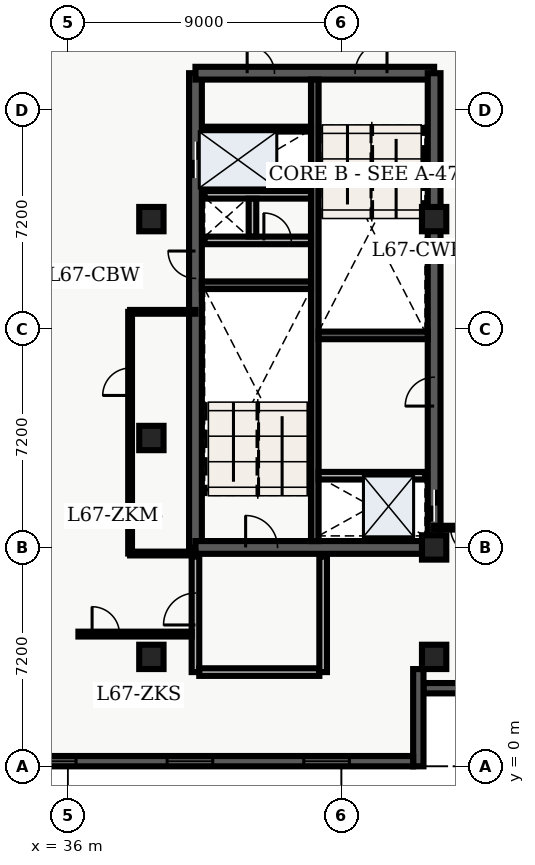
"""IFC4 building model, lengths in metres.
Left out: names, types, materials, properties, quantities, classifications, styles, units other than length and angle.
Written with IfcOpenShell. Run it as: python <this file> out.ifc"""

import sys

from ifc_helpers import new_model, entity, si_unit, converted_unit, direction, frame, origin_with_axes, origin_2d_with_axis, place, context, subcontext, project, spatial, polyline, rectangle, outline, extrude, element, fill, save


model = new_model("IFC4")
c1 = context("Model", 3, precision=1e-05, world=origin_with_axes(), true_north=direction((0.0, 1.0)))
c2 = subcontext(c1, "Body", "Model", "MODEL_VIEW")
j1 = project(units=[si_unit("LENGTHUNIT", "METRE"), converted_unit("PLANEANGLEUNIT", "DEGREE", entity("IfcPlaneAngleMeasure", 0.017), si_unit("PLANEANGLEUNIT", "RADIAN"), dimensions=[0, 0, 0, 0, 0, 0, 0])], contexts=[c1])
p1 = place(None, origin_with_axes())
s1 = spatial("IfcSite", under=j1, at=p1, CompositionType="ELEMENT")
p2 = place(p1, origin_with_axes())
s2 = spatial("IfcBuilding", under=s1, at=p2, CompositionType="ELEMENT")
p3 = place(p2, frame((0.0, 0.0, 272.4), z_axis=(0.0, 0.0, 1.0), x_axis=(1.0, 0.0, 0.0)))
s3 = spatial("IfcBuildingStorey", under=s2, at=p3, CompositionType="ELEMENT", Elevation=272.4)
p4 = place(p3, frame((40.2, 7.2, 0.0), z_axis=(0.0, 0.0, 1.0), x_axis=(0.0, 1.0, 0.0)))
e1 = element("IfcWall", 1, at=p4, inside=s3, PredefinedType="SHEAR", context=c2, shape_type="SweptSolid", body=[
    extrude(outline(polyline([(0.0, -0.21), (15.6, -0.21), (15.6, 0.21), (0.0, 0.21), (0.0, -0.21)])), origin_with_axes(), (0.0, 0.0, 1.0), 3.66),
])
p5 = place(p4, frame((12.75, 0.0, 0.0), z_axis=(0.0, 0.0, 1.0), x_axis=(1.0, 0.0, 0.0)))
e2 = element("IfcOpeningElement", 2, at=p5, cuts=e1, PredefinedType="OPENING", context=c2, shape_type="SweptSolid", body=[
    extrude(rectangle(XDim=1.2, YDim=0.44, at=origin_2d_with_axis()), origin_with_axes(), (0.0, 0.0, 1.0), 2.15),
])
p6 = place(p4, frame((9.3, 0.0, 0.0), z_axis=(0.0, 0.0, 1.0), x_axis=(1.0, 0.0, 0.0)))
e3 = element("IfcOpeningElement", 3, at=p6, cuts=e1, PredefinedType="OPENING", context=c2, shape_type="SweptSolid", body=[
    extrude(rectangle(XDim=0.9, YDim=0.44, at=origin_2d_with_axis()), origin_with_axes(), (0.0, 0.0, 1.0), 2.15),
])
p7 = place(p3, frame((40.2, 7.2, 0.0), z_axis=(0.0, 0.0, 1.0), x_axis=(1.0, 0.0, 0.0)))
e4 = element("IfcWall", 4, at=p7, inside=s3, PredefinedType="SHEAR", context=c2, shape_type="SweptSolid", body=[
    extrude(outline(polyline([(0.0, -0.21), (7.85, -0.21), (7.85, 0.21), (0.0, 0.21), (0.0, -0.21)])), origin_with_axes(), (0.0, 0.0, 1.0), 3.66),
])
p8 = place(p7, frame((2.175, 0.0, 0.0), z_axis=(0.0, 0.0, 1.0), x_axis=(1.0, 0.0, 0.0)))
e5 = element("IfcOpeningElement", 5, at=p8, cuts=e4, PredefinedType="OPENING", context=c2, shape_type="SweptSolid", body=[
    extrude(rectangle(XDim=1.05, YDim=0.44, at=origin_2d_with_axis()), origin_with_axes(), (0.0, 0.0, 1.0), 2.15),
])
p9 = place(p3, frame((40.2, 22.8, 0.0), z_axis=(0.0, 0.0, 1.0), x_axis=(1.0, 0.0, 0.0)))
e6 = element("IfcWall", 6, at=p9, inside=s3, PredefinedType="SHEAR", context=c2, shape_type="SweptSolid", body=[
    extrude(outline(polyline([(0.0, -0.21), (7.85, -0.21), (7.85, 0.21), (0.0, 0.21), (0.0, -0.21)])), origin_with_axes(), (0.0, 0.0, 1.0), 3.66),
])
p10 = place(p9, frame((5.775, 0.0, 0.0), z_axis=(0.0, 0.0, 1.0), x_axis=(1.0, 0.0, 0.0)))
e7 = element("IfcOpeningElement", 7, at=p10, cuts=e6, PredefinedType="OPENING", context=c2, shape_type="SweptSolid", body=[
    extrude(rectangle(XDim=1.05, YDim=0.44, at=origin_2d_with_axis()), origin_with_axes(), (0.0, 0.0, 1.0), 2.15),
])
p11 = place(p9, frame((2.15, 0.0, 0.0), z_axis=(0.0, 0.0, 1.0), x_axis=(1.0, 0.0, 0.0)))
e8 = element("IfcOpeningElement", 8, at=p11, cuts=e6, PredefinedType="OPENING", context=c2, shape_type="SweptSolid", body=[
    extrude(rectangle(XDim=0.9, YDim=0.44, at=origin_2d_with_axis()), origin_with_axes(), (0.0, 0.0, 1.0), 2.15),
])
p12 = place(p3, frame((48.05, 7.2, 0.0), z_axis=(0.0, 0.0, 1.0), x_axis=(0.0, 1.0, 0.0)))
e9 = element("IfcWall", 9, at=p12, inside=s3, PredefinedType="SHEAR", context=c2, shape_type="SweptSolid", body=[
    extrude(outline(polyline([(0.0, -0.21), (15.6, -0.21), (15.6, 0.21), (0.0, 0.21), (0.0, -0.21)])), origin_with_axes(), (0.0, 0.0, 1.0), 3.66),
])
p13 = place(p12, frame((1.375, 0.0, 0.0), z_axis=(0.0, 0.0, 1.0), x_axis=(1.0, 0.0, 0.0)))
e10 = element("IfcOpeningElement", 10, at=p13, cuts=e9, PredefinedType="OPENING", context=c2, shape_type="SweptSolid", body=[
    extrude(rectangle(XDim=1.05, YDim=0.44, at=origin_2d_with_axis()), origin_with_axes(), (0.0, 0.0, 1.0), 2.15),
])
p14 = place(p12, frame((5.125, 0.0, 0.0), z_axis=(0.0, 0.0, 1.0), x_axis=(1.0, 0.0, 0.0)))
e11 = element("IfcOpeningElement", 11, at=p14, cuts=e9, PredefinedType="OPENING", context=c2, shape_type="SweptSolid", body=[
    extrude(rectangle(XDim=0.95, YDim=0.44, at=origin_2d_with_axis()), origin_with_axes(), (0.0, 0.0, 1.0), 2.15),
])
p15 = place(p3, frame((44.125, 7.41, 0.0), z_axis=(0.0, 0.0, 1.0), x_axis=(0.0, 1.0, 0.0)))
e12 = element("IfcWall", 12, at=p15, inside=s3, PredefinedType="SHEAR", context=c2, shape_type="SweptSolid", body=[
    extrude(outline(polyline([(0.0, -0.125), (15.18, -0.125), (15.18, 0.125), (0.0, 0.125), (0.0, -0.125)])), origin_with_axes(), (0.0, 0.0, 1.0), 3.66),
])
for number, where, z_axis, x_axis in (
    (13, (40.41, 15.825, 0.0), (0.0, 0.0, 1.0), (1.0, 0.0, 0.0)),
    (14, (44.25, 14.175, 0.0), (0.0, 0.0, 1.0), (1.0, 0.0, 0.0)),
):
    element("IfcWall", number, at=place(p3, frame(where, z_axis=z_axis, x_axis=x_axis)), inside=s3, PredefinedType="SHEAR", context=c2, shape_type="SweptSolid", body=[
        extrude(outline(polyline([(0.0, -0.125), (3.59, -0.125), (3.59, 0.125), (0.0, 0.125), (0.0, -0.125)])), origin_with_axes(), (0.0, 0.0, 1.0), 3.66),
    ])
p16 = place(p3, frame((40.5, 17.3, 0.0), z_axis=(0.0, 0.0, 1.0), x_axis=(1.0, 0.0, 0.0)))
e15 = element("IfcWall", 15, at=p16, inside=s3, PredefinedType="SOLIDWALL", context=c2, shape_type="SweptSolid", body=[
    extrude(outline(polyline([(0.0, -0.125), (3.5, -0.125), (3.5, 0.125), (0.0, 0.125), (0.0, -0.125)])), origin_with_axes(), (0.0, 0.0, 1.0), 2.7),
])
p17 = place(p16, frame((2.4, 0.0, 0.0), z_axis=(0.0, 0.0, 1.0), x_axis=(1.0, 0.0, 0.0)))
e16 = element("IfcOpeningElement", 16, at=p17, cuts=e15, PredefinedType="OPENING", context=c2, shape_type="SweptSolid", body=[
    extrude(rectangle(XDim=0.9, YDim=0.27, at=origin_2d_with_axis()), origin_with_axes(), (0.0, 0.0, 1.0), 2.15),
])
p18 = place(p3, frame((40.5, 18.8, 0.0), z_axis=(0.0, 0.0, 1.0), x_axis=(1.0, 0.0, 0.0)))
e17 = element("IfcWall", 17, at=p18, inside=s3, PredefinedType="SOLIDWALL", context=c2, shape_type="SweptSolid", body=[
    extrude(outline(polyline([(0.0, -0.125), (3.5, -0.125), (3.5, 0.125), (0.0, 0.125), (0.0, -0.125)])), origin_with_axes(), (0.0, 0.0, 1.0), 2.7),
])
p19 = place(p3, frame((42.075, 17.43, 0.0), z_axis=(0.0, 0.0, 1.0), x_axis=(0.0, 1.0, 0.0)))
e18 = element("IfcWall", 18, at=p19, inside=s3, PredefinedType="SOLIDWALL", context=c2, shape_type="SweptSolid", body=[
    extrude(outline(polyline([(0.0, -0.125), (1.24, -0.125), (1.24, 0.125), (0.0, 0.125), (0.0, -0.125)])), origin_with_axes(), (0.0, 0.0, 1.0), 2.7),
])
p20 = place(p3, frame((40.2, 3.1, 0.0), z_axis=(0.0, 0.0, 1.0), x_axis=(0.0, 1.0, 0.0)))
e19 = element("IfcWall", 19, at=p20, inside=s3, PredefinedType="SOLIDWALL", context=c2, shape_type="SweptSolid", body=[
    extrude(outline(polyline([(0.0, -0.125), (3.8, -0.125), (3.8, 0.125), (0.0, 0.125), (0.0, -0.125)])), origin_with_axes(), (0.0, 0.0, 1.0), 2.7),
])
p21 = place(p20, frame((2.075, 0.0, 0.0), z_axis=(0.0, 0.0, 1.0), x_axis=(1.0, 0.0, 0.0)))
e20 = element("IfcOpeningElement", 20, at=p21, cuts=e19, PredefinedType="OPENING", context=c2, shape_type="SweptSolid", body=[
    extrude(rectangle(XDim=1.05, YDim=0.27, at=origin_2d_with_axis()), origin_with_axes(), (0.0, 0.0, 1.0), 2.15),
])
p22 = place(p3, frame((40.325, 3.1, 0.0), z_axis=(0.0, 0.0, 1.0), x_axis=(1.0, 0.0, 0.0)))
e21 = element("IfcWall", 21, at=p22, inside=s3, PredefinedType="SOLIDWALL", context=c2, shape_type="SweptSolid", body=[
    extrude(outline(polyline([(0.0, -0.125), (3.95, -0.125), (3.95, 0.125), (0.0, 0.125), (0.0, -0.125)])), origin_with_axes(), (0.0, 0.0, 1.0), 2.7),
])
p23 = place(p3, frame((44.4, 3.1, 0.0), z_axis=(0.0, 0.0, 1.0), x_axis=(0.0, 1.0, 0.0)))
e22 = element("IfcWall", 22, at=p23, inside=s3, PredefinedType="SOLIDWALL", context=c2, shape_type="SweptSolid", body=[
    extrude(outline(polyline([(0.0, -0.125), (3.8, -0.125), (3.8, 0.125), (0.0, 0.125), (0.0, -0.125)])), origin_with_axes(), (0.0, 0.0, 1.0), 2.7),
])
for number, where, z_axis, x_axis in (
    (23, (38.75, 3.6, 0.0), (0.0, 0.0, 1.0), (1.0, 0.0, 0.0)),
    (24, (38.75, 10.8, 0.0), (0.0, 0.0, 1.0), (1.0, 0.0, 0.0)),
    (25, (38.75, 18.0, 0.0), (0.0, 0.0, 1.0), (1.0, 0.0, 0.0)),
    (26, (48.05, 3.6, 0.0), (0.0, 0.0, 1.0), (1.0, 0.0, 0.0)),
    (27, (48.05, 7.2, 0.0), (0.0, 0.0, 1.0), (1.0, 0.0, 0.0)),
    (28, (48.05, 18.0, 0.0), (0.0, 0.0, 1.0), (1.0, 0.0, 0.0)),
):
    element("IfcColumn", number, at=place(p3, frame(where, z_axis=z_axis, x_axis=x_axis)), inside=s3, PredefinedType="COLUMN", context=c2, shape_type="SweptSolid", body=[
        extrude(rectangle(XDim=0.8, YDim=0.8, at=origin_2d_with_axis()), origin_with_axes(), (0.0, 0.0, 1.0), 3.9),
    ])
p24 = place(p3, frame((40.5, 20.96, 0.0), z_axis=(0.0, 0.0, 1.0), x_axis=(1.0, 0.0, 0.0)))
e29 = element("IfcWall", 29, at=p24, inside=s3, PredefinedType="PARTITIONING", context=c2, shape_type="SweptSolid", body=[
    extrude(outline(polyline([(0.0, -0.08), (3.5, -0.08), (3.5, 0.08), (0.0, 0.08), (0.0, -0.08)])), origin_with_axes(), (0.0, 0.0, 1.0), 2.7),
])
p25 = place(p3, frame((44.25, 9.56, 0.0), z_axis=(0.0, 0.0, 1.0), x_axis=(1.0, 0.0, 0.0)))
e30 = element("IfcWall", 30, at=p25, inside=s3, PredefinedType="SOLIDWALL", context=c2, shape_type="SweptSolid", body=[
    extrude(outline(polyline([(0.0, -0.125), (3.5, -0.125), (3.5, 0.125), (0.0, 0.125), (0.0, -0.125)])), origin_with_axes(), (0.0, 0.0, 1.0), 2.7),
])
p26 = place(p3, frame((49.765, 7.85, 0.0), z_axis=(0.0, 0.0, 1.0), x_axis=(-1.0, 0.0, 0.0)))
e31 = element("IfcWall", 31, at=p26, inside=s3, PredefinedType="PARTITIONING", context=c2, shape_type="SweptSolid", body=[
    extrude(outline(polyline([(0.0, -0.062), (1.715, -0.062), (1.715, 0.062), (0.0, 0.062), (0.0, -0.062)])), origin_with_axes(), (0.0, 0.0, 1.0), 2.7),
])
p27 = place(p26, frame((0.725, 0.0, 0.0), z_axis=(0.0, 0.0, 1.0), x_axis=(1.0, 0.0, 0.0)))
e32 = element("IfcOpeningElement", 32, at=p27, cuts=e31, PredefinedType="OPENING", context=c2, shape_type="SweptSolid", body=[
    extrude(rectangle(XDim=0.9, YDim=0.145, at=origin_2d_with_axis()), origin_with_axes(), (0.0, 0.0, 1.0), 2.15),
])
p28 = place(p3, frame((36.35, 4.35, 0.0), z_axis=(0.0, 0.0, 1.0), x_axis=(1.0, 0.0, 0.0)))
e33 = element("IfcWall", 33, at=p28, inside=s3, PredefinedType="PARTITIONING", context=c2, shape_type="SweptSolid", body=[
    extrude(outline(polyline([(0.0, -0.08), (3.725, -0.08), (3.725, 0.08), (0.0, 0.08), (0.0, -0.08)])), origin_with_axes(), (0.0, 0.0, 1.0), 2.7),
])
p29 = place(p28, frame((0.9, 0.0, 0.0), z_axis=(0.0, 0.0, 1.0), x_axis=(1.0, 0.0, 0.0)))
e34 = element("IfcOpeningElement", 34, at=p29, cuts=e33, PredefinedType="OPENING", context=c2, shape_type="SweptSolid", body=[
    extrude(rectangle(XDim=0.9, YDim=0.18, at=origin_2d_with_axis()), origin_with_axes(), (0.0, 0.0, 1.0), 2.15),
])
for number, where, z_axis, x_axis in (
    (35, (38.05, 7.0, 0.0), (0.0, 0.0, 1.0), (1.0, 0.0, 0.0)),
    (36, (38.05, 14.95, 0.0), (0.0, 0.0, 1.0), (1.0, 0.0, 0.0)),
):
    element("IfcWall", number, at=place(p3, frame(where, z_axis=z_axis, x_axis=x_axis)), inside=s3, PredefinedType="PARTITIONING", context=c2, shape_type="SweptSolid", body=[
        extrude(outline(polyline([(0.0, -0.062), (2.15, -0.062), (2.15, 0.062), (0.0, 0.062), (0.0, -0.062)])), origin_with_axes(), (0.0, 0.0, 1.0), 2.7),
    ])
p30 = place(p3, frame((38.05, 7.0, 0.0), z_axis=(0.0, 0.0, 1.0), x_axis=(0.0, 1.0, 0.0)))
e37 = element("IfcWall", 37, at=p30, inside=s3, PredefinedType="PARTITIONING", context=c2, shape_type="SweptSolid", body=[
    extrude(outline(polyline([(0.0, -0.062), (7.95, -0.062), (7.95, 0.062), (0.0, 0.062), (0.0, -0.062)])), origin_with_axes(), (0.0, 0.0, 1.0), 2.7),
])
p31 = place(p30, frame((5.65, 0.0, 0.0), z_axis=(0.0, 0.0, 1.0), x_axis=(1.0, 0.0, 0.0)))
e38 = element("IfcOpeningElement", 38, at=p31, cuts=e37, PredefinedType="OPENING", context=c2, shape_type="SweptSolid", body=[
    extrude(rectangle(XDim=0.9, YDim=0.145, at=origin_2d_with_axis()), origin_with_axes(), (0.0, 0.0, 1.0), 2.15),
])
p32 = place(p3, frame((49.76, 2.57, 0.0), z_axis=(0.0, 0.0, 1.0), x_axis=(-1.0, 0.0, 0.0)))
e39 = element("IfcWall", 39, at=p32, inside=s3, PredefinedType="SOLIDWALL", context=c2, shape_type="SweptSolid", body=[
    extrude(outline(polyline([(0.0, -0.17), (2.06, -0.17), (2.06, 0.17), (0.0, 0.17), (0.0, -0.17)])), origin_with_axes(), (0.0, 0.0, 1.0), 3.66),
])
p33 = place(p3, frame((47.53, 3.2, 0.0), z_axis=(0.0, 0.0, 1.0), x_axis=(0.0, -1.0, 0.0)))
e40 = element("IfcWall", 40, at=p33, inside=s3, PredefinedType="SOLIDWALL", context=c2, shape_type="SweptSolid", body=[
    extrude(outline(polyline([(0.0, -0.17), (3.2, -0.17), (3.2, 0.17), (0.0, 0.17), (0.0, -0.17)])), origin_with_axes(), (0.0, 0.0, 1.0), 3.66),
])
p34 = place(p3, frame((47.36, 0.17, 0.0), z_axis=(0.0, 0.0, 1.0), x_axis=(-1.0, 0.0, 0.0)))
e41 = element("IfcWall", 41, at=p34, inside=s3, PredefinedType="SOLIDWALL", context=c2, shape_type="SweptSolid", body=[
    extrude(outline(polyline([(0.0, -0.17), (37.16, -0.17), (37.16, 0.17), (0.0, 0.17), (0.0, -0.17)])), origin_with_axes(), (0.0, 0.0, 1.0), 3.66),
])
p35 = place(p34, frame((2.847, 0.0, 0.45), z_axis=(0.0, 0.0, 1.0), x_axis=(1.0, 0.0, 0.0)))
e42 = element("IfcOpeningElement", 42, at=p35, cuts=e41, PredefinedType="OPENING", context=c2, shape_type="SweptSolid", body=[
    extrude(rectangle(XDim=1.5, YDim=0.36, at=origin_2d_with_axis()), origin_with_axes(), (0.0, 0.0, 1.0), 2.1),
])
p36 = place(p34, frame((7.342, 0.0, 0.45), z_axis=(0.0, 0.0, 1.0), x_axis=(1.0, 0.0, 0.0)))
e43 = element("IfcOpeningElement", 43, at=p36, cuts=e41, PredefinedType="OPENING", context=c2, shape_type="SweptSolid", body=[
    extrude(rectangle(XDim=1.5, YDim=0.36, at=origin_2d_with_axis()), origin_with_axes(), (0.0, 0.0, 1.0), 2.1),
])
p37 = place(p34, frame((11.837, 0.0, 0.45), z_axis=(0.0, 0.0, 1.0), x_axis=(1.0, 0.0, 0.0)))
e44 = element("IfcOpeningElement", 44, at=p37, cuts=e41, PredefinedType="OPENING", context=c2, shape_type="SweptSolid", body=[
    extrude(rectangle(XDim=1.5, YDim=0.36, at=origin_2d_with_axis()), origin_with_axes(), (0.0, 0.0, 1.0), 2.1),
])
p38 = place(p34, frame((16.332, 0.0, 0.45), z_axis=(0.0, 0.0, 1.0), x_axis=(1.0, 0.0, 0.0)))
e45 = element("IfcOpeningElement", 45, at=p38, cuts=e41, PredefinedType="OPENING", context=c2, shape_type="SweptSolid", body=[
    extrude(rectangle(XDim=1.5, YDim=0.36, at=origin_2d_with_axis()), origin_with_axes(), (0.0, 0.0, 1.0), 2.1),
])
p39 = place(p34, frame((20.827, 0.0, 0.45), z_axis=(0.0, 0.0, 1.0), x_axis=(1.0, 0.0, 0.0)))
e46 = element("IfcOpeningElement", 46, at=p39, cuts=e41, PredefinedType="OPENING", context=c2, shape_type="SweptSolid", body=[
    extrude(rectangle(XDim=1.5, YDim=0.36, at=origin_2d_with_axis()), origin_with_axes(), (0.0, 0.0, 1.0), 2.1),
])
p40 = place(p34, frame((25.322, 0.0, 0.45), z_axis=(0.0, 0.0, 1.0), x_axis=(1.0, 0.0, 0.0)))
e47 = element("IfcOpeningElement", 47, at=p40, cuts=e41, PredefinedType="OPENING", context=c2, shape_type="SweptSolid", body=[
    extrude(rectangle(XDim=1.5, YDim=0.36, at=origin_2d_with_axis()), origin_with_axes(), (0.0, 0.0, 1.0), 2.1),
])
p41 = place(p34, frame((29.817, 0.0, 0.45), z_axis=(0.0, 0.0, 1.0), x_axis=(1.0, 0.0, 0.0)))
e48 = element("IfcOpeningElement", 48, at=p41, cuts=e41, PredefinedType="OPENING", context=c2, shape_type="SweptSolid", body=[
    extrude(rectangle(XDim=1.5, YDim=0.36, at=origin_2d_with_axis()), origin_with_axes(), (0.0, 0.0, 1.0), 2.1),
])
p42 = place(p34, frame((34.312, 0.0, 0.45), z_axis=(0.0, 0.0, 1.0), x_axis=(1.0, 0.0, 0.0)))
e49 = element("IfcOpeningElement", 49, at=p42, cuts=e41, PredefinedType="OPENING", context=c2, shape_type="SweptSolid", body=[
    extrude(rectangle(XDim=1.5, YDim=0.36, at=origin_2d_with_axis()), origin_with_axes(), (0.0, 0.0, 1.0), 2.1),
])
p43 = place(p12, frame((1.375, 0.0, 0.0), z_axis=(0.0, 0.0, 1.0), x_axis=(1.0, 0.0, 0.0)))
e50 = element("IfcDoor", 50, at=p43, inside=s3, OperationType="SLIDING_TO_LEFT", PredefinedType="DOOR", context=c2, shape_type="SweptSolid", body=[
    extrude(rectangle(XDim=1.05, YDim=0.09, at=origin_2d_with_axis()), origin_with_axes(), (0.0, 0.0, 1.0), 2.15),
])
fill(e10, e50)
p44 = place(p4, frame((12.75, 0.0, 0.0), z_axis=(0.0, 0.0, 1.0), x_axis=(1.0, 0.0, 0.0)))
e51 = element("IfcDoor", 51, at=p44, inside=s3, OperationType="DOUBLE_DOOR_SLIDING", PredefinedType="DOOR", context=c2, shape_type="SweptSolid", body=[
    extrude(rectangle(XDim=1.2, YDim=0.09, at=origin_2d_with_axis()), origin_with_axes(), (0.0, 0.0, 1.0), 2.15),
])
fill(e2, e51)
p45 = place(p4, frame((9.3, 0.0, 0.0), z_axis=(0.0, 0.0, 1.0), x_axis=(1.0, 0.0, 0.0)))
e52 = element("IfcDoor", 52, at=p45, inside=s3, OperationType="SINGLE_SWING_RIGHT", PredefinedType="DOOR", context=c2, shape_type="SweptSolid", body=[
    extrude(rectangle(XDim=0.9, YDim=0.09, at=origin_2d_with_axis()), origin_with_axes(), (0.0, 0.0, 1.0), 2.15),
])
fill(e3, e52)
p46 = place(p16, frame((2.4, 0.0, 0.0), z_axis=(0.0, 0.0, 1.0), x_axis=(1.0, 0.0, 0.0)))
e53 = element("IfcDoor", 53, at=p46, inside=s3, OperationType="SINGLE_SWING_LEFT", PredefinedType="DOOR", context=c2, shape_type="SweptSolid", body=[
    extrude(rectangle(XDim=0.9, YDim=0.09, at=origin_2d_with_axis()), origin_with_axes(), (0.0, 0.0, 1.0), 2.15),
])
fill(e16, e53)
p47 = place(p7, frame((2.175, 0.0, 0.0), z_axis=(0.0, 0.0, 1.0), x_axis=(1.0, 0.0, 0.0)))
e54 = element("IfcDoor", 54, at=p47, inside=s3, OperationType="SINGLE_SWING_LEFT", PredefinedType="DOOR", context=c2, shape_type="SweptSolid", body=[
    extrude(rectangle(XDim=1.05, YDim=0.09, at=origin_2d_with_axis()), origin_with_axes(), (0.0, 0.0, 1.0), 2.15),
])
fill(e5, e54)
p48 = place(p9, frame((5.775, 0.0, 0.0), z_axis=(0.0, 0.0, 1.0), x_axis=(1.0, 0.0, 0.0)))
e55 = element("IfcDoor", 55, at=p48, inside=s3, OperationType="SINGLE_SWING_RIGHT", PredefinedType="DOOR", context=c2, shape_type="SweptSolid", body=[
    extrude(rectangle(XDim=1.05, YDim=0.09, at=origin_2d_with_axis()), origin_with_axes(), (0.0, 0.0, 1.0), 2.15),
])
fill(e7, e55)
p49 = place(p20, frame((2.075, 0.0, 0.0), z_axis=(0.0, 0.0, 1.0), x_axis=(1.0, 0.0, 0.0)))
e56 = element("IfcDoor", 56, at=p49, inside=s3, OperationType="SINGLE_SWING_LEFT", PredefinedType="DOOR", context=c2, shape_type="SweptSolid", body=[
    extrude(rectangle(XDim=1.05, YDim=0.09, at=origin_2d_with_axis()), origin_with_axes(), (0.0, 0.0, 1.0), 2.15),
])
fill(e20, e56)
p50 = place(p9, frame((2.15, 0.0, 0.0), z_axis=(0.0, 0.0, 1.0), x_axis=(1.0, 0.0, 0.0)))
e57 = element("IfcDoor", 57, at=p50, inside=s3, OperationType="SINGLE_SWING_LEFT", PredefinedType="DOOR", context=c2, shape_type="SweptSolid", body=[
    extrude(rectangle(XDim=0.9, YDim=0.09, at=origin_2d_with_axis()), origin_with_axes(), (0.0, 0.0, 1.0), 2.15),
])
fill(e8, e57)
p51 = place(p12, frame((5.125, 0.0, 0.0), z_axis=(0.0, 0.0, 1.0), x_axis=(1.0, 0.0, 0.0)))
e58 = element("IfcDoor", 58, at=p51, inside=s3, OperationType="SINGLE_SWING_LEFT", PredefinedType="DOOR", context=c2, shape_type="SweptSolid", body=[
    extrude(rectangle(XDim=0.95, YDim=0.09, at=origin_2d_with_axis()), origin_with_axes(), (0.0, 0.0, 1.0), 2.15),
])
fill(e11, e58)
p52 = place(p26, frame((0.725, 0.0, 0.0), z_axis=(0.0, 0.0, 1.0), x_axis=(1.0, 0.0, 0.0)))
e59 = element("IfcDoor", 59, at=p52, inside=s3, OperationType="SINGLE_SWING_LEFT", PredefinedType="DOOR", context=c2, shape_type="SweptSolid", body=[
    extrude(rectangle(XDim=0.9, YDim=0.075, at=origin_2d_with_axis()), origin_with_axes(), (0.0, 0.0, 1.0), 2.15),
])
fill(e32, e59)
p53 = place(p28, frame((0.9, 0.0, 0.0), z_axis=(0.0, 0.0, 1.0), x_axis=(1.0, 0.0, 0.0)))
e60 = element("IfcDoor", 60, at=p53, inside=s3, OperationType="SINGLE_SWING_LEFT", PredefinedType="DOOR", context=c2, shape_type="SweptSolid", body=[
    extrude(rectangle(XDim=0.9, YDim=0.09, at=origin_2d_with_axis()), origin_with_axes(), (0.0, 0.0, 1.0), 2.15),
])
fill(e34, e60)
p54 = place(p30, frame((5.65, 0.0, 0.0), z_axis=(0.0, 0.0, 1.0), x_axis=(1.0, 0.0, 0.0)))
e61 = element("IfcDoor", 61, at=p54, inside=s3, OperationType="SINGLE_SWING_LEFT", PredefinedType="DOOR", context=c2, shape_type="SweptSolid", body=[
    extrude(rectangle(XDim=0.9, YDim=0.075, at=origin_2d_with_axis()), origin_with_axes(), (0.0, 0.0, 1.0), 2.15),
])
fill(e38, e61)
p55 = place(p34, frame((2.847, 0.0, 0.45), z_axis=(0.0, 0.0, 1.0), x_axis=(1.0, 0.0, 0.0)))
e62 = element("IfcWindow", 62, at=p55, inside=s3, PredefinedType="WINDOW", context=c2, shape_type="SweptSolid", body=[
    extrude(rectangle(XDim=1.5, YDim=0.09, at=origin_2d_with_axis()), origin_with_axes(), (0.0, 0.0, 1.0), 2.1),
])
fill(e42, e62)
p56 = place(p34, frame((7.342, 0.0, 0.45), z_axis=(0.0, 0.0, 1.0), x_axis=(1.0, 0.0, 0.0)))
e63 = element("IfcWindow", 63, at=p56, inside=s3, PredefinedType="WINDOW", context=c2, shape_type="SweptSolid", body=[
    extrude(rectangle(XDim=1.5, YDim=0.09, at=origin_2d_with_axis()), origin_with_axes(), (0.0, 0.0, 1.0), 2.1),
])
fill(e43, e63)
p57 = place(p34, frame((11.837, 0.0, 0.45), z_axis=(0.0, 0.0, 1.0), x_axis=(1.0, 0.0, 0.0)))
e64 = element("IfcWindow", 64, at=p57, inside=s3, PredefinedType="WINDOW", context=c2, shape_type="SweptSolid", body=[
    extrude(rectangle(XDim=1.5, YDim=0.09, at=origin_2d_with_axis()), origin_with_axes(), (0.0, 0.0, 1.0), 2.1),
])
fill(e44, e64)
save(model, sys.argv[1])
